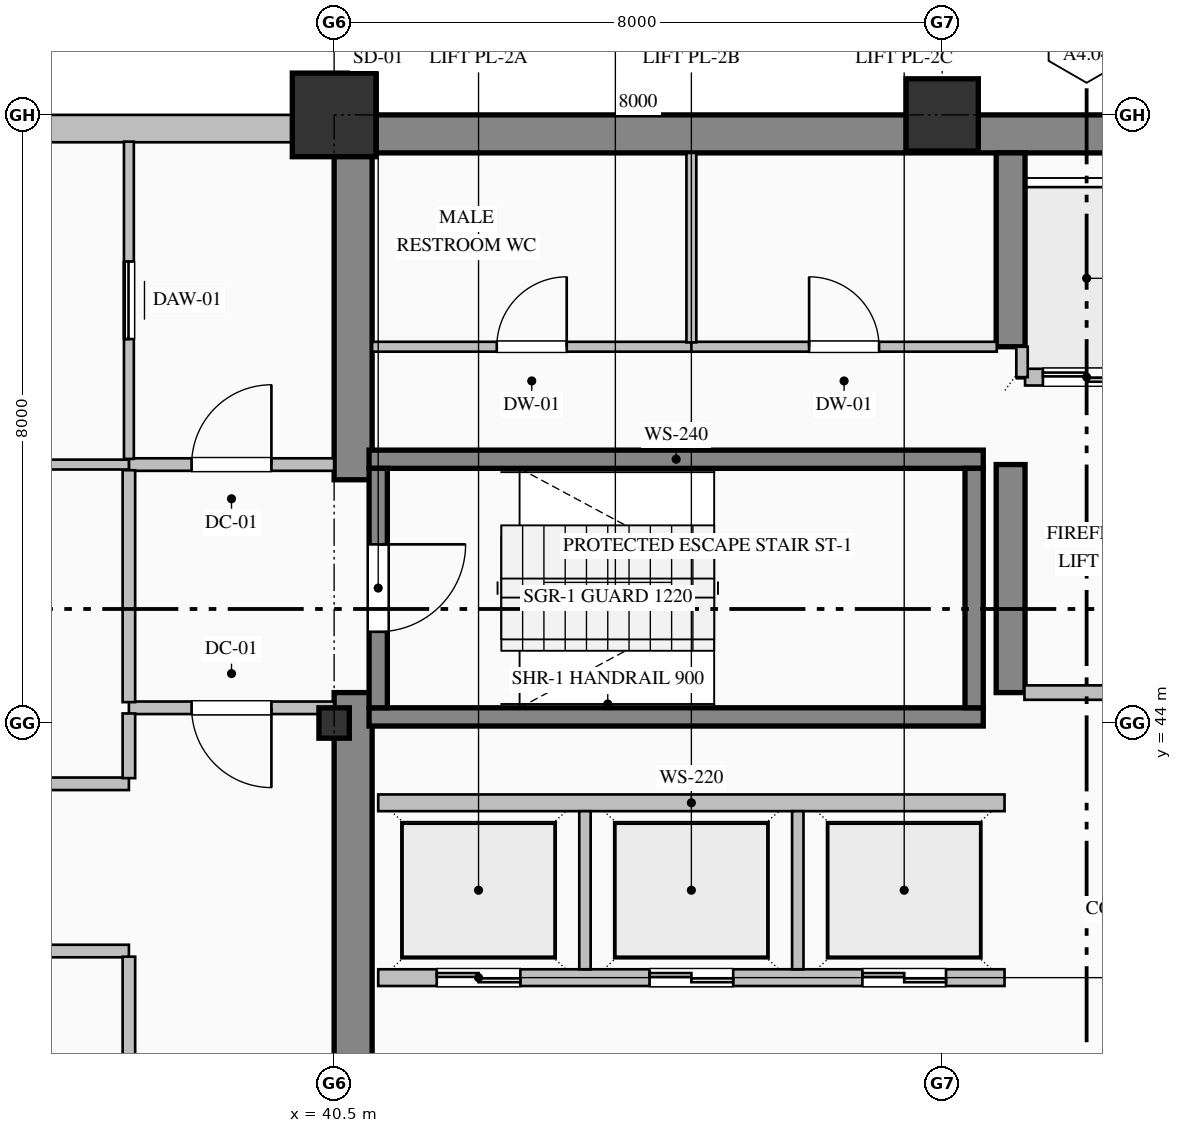
"""IFC4 building model, lengths in metres.
Left out: names, types, materials, properties, quantities, classifications, styles, units other than length and angle.
Written with IfcOpenShell. Run it as: python <this file> out.ifc"""

import sys

from ifc_helpers import new_model, si_unit, direction, frame, frame_2d, origin, origin_2d, place, context, subcontext, project, spatial, rectangle, hollow_rectangle, i_section, extrude, element, fill, save


model = new_model("IFC4")
c1 = context("Model", 3, precision=1e-05, world=origin(), true_north=direction((0.0, 1.0)))
c2 = subcontext(c1, "Body", "Model", "MODEL_VIEW")
j1 = project(units=[si_unit("LENGTHUNIT", "METRE"), si_unit("PLANEANGLEUNIT", "RADIAN")], contexts=[c1])
p1 = place(None, origin())
s1 = spatial("IfcSite", under=j1, at=p1, CompositionType="ELEMENT")
p2 = place(p1, origin())
s2 = spatial("IfcBuilding", under=s1, at=p2, CompositionType="ELEMENT")
p3 = place(p2, frame((0.0, 0.0, 183.0)))
s3 = spatial("IfcBuildingStorey", under=s2, at=p3, CompositionType="ELEMENT", Elevation=183.0)
p4 = place(p3, frame((40.5, 51.75, 0.0), z_axis=(0.0, 0.0, 1.0), x_axis=(1.0, 0.0, 0.0)))
e1 = element("IfcWall", 1, at=p4, inside=s3, PredefinedType="SHEAR", context=c2, shape_type="SweptSolid", body=[
    extrude(rectangle(XDim=23.5, YDim=0.5, at=frame_2d((11.75, 0.0))), origin(), (0.0, 0.0, 1.0), 3.765),
])
p5 = place(p3, frame((40.75, 36.5, 0.0), z_axis=(0.0, 0.0, 1.0), x_axis=(0.0, 1.0, 0.0)))
e2 = element("IfcWall", 2, at=p5, inside=s3, PredefinedType="SHEAR", context=c2, shape_type="SweptSolid", body=[
    extrude(rectangle(XDim=7.9, YDim=0.5, at=frame_2d((3.95, 0.0))), origin(), (0.0, 0.0, 1.0), 3.765),
])
p6 = place(p3, frame((40.75, 47.2, 0.0), z_axis=(0.0, 0.0, 1.0), x_axis=(0.0, 1.0, 0.0)))
e3 = element("IfcWall", 3, at=p6, inside=s3, PredefinedType="SHEAR", context=c2, shape_type="SweptSolid", body=[
    extrude(rectangle(XDim=4.3, YDim=0.5, at=frame_2d((2.15, 0.0))), origin(), (0.0, 0.0, 1.0), 3.765),
])
p7 = place(p3, frame((49.4, 44.4, 0.0), z_axis=(0.0, 0.0, 1.0), x_axis=(0.0, 1.0, 0.0)))
e4 = element("IfcWall", 4, at=p7, inside=s3, PredefinedType="SHEAR", context=c2, shape_type="SweptSolid", body=[
    extrude(rectangle(XDim=3.0, YDim=0.38, at=frame_2d((1.5, 0.0))), origin(), (0.0, 0.0, 1.0), 3.765),
])
p8 = place(p3, frame((49.4, 48.95, 0.0), z_axis=(0.0, 0.0, 1.0), x_axis=(0.0, 1.0, 0.0)))
e5 = element("IfcWall", 5, at=p8, inside=s3, PredefinedType="SHEAR", context=c2, shape_type="SweptSolid", body=[
    extrude(rectangle(XDim=2.55, YDim=0.38, at=frame_2d((1.275, 0.0))), origin(), (0.0, 0.0, 1.0), 3.765),
])
p9 = place(p3, frame((40.5, 44.0, 0.0), z_axis=(0.0, 0.0, 1.0), x_axis=(1.0, 0.0, 0.0)))
e6 = element("IfcColumn", 6, at=p9, inside=s3, PredefinedType="COLUMN", context=c2, shape_type="SweptSolid", body=[
    extrude(i_section(OverallWidth=0.4, OverallDepth=0.4, WebThickness=0.013, FlangeThickness=0.021, FilletRadius=0.022, at=origin_2d()), origin(), (0.0, 0.0, 1.0), 4.0),
])
p10 = place(p3, frame((40.5, 52.0, 0.0), z_axis=(0.0, 0.0, 1.0), x_axis=(1.0, 0.0, 0.0)))
e7 = element("IfcColumn", 7, at=p10, inside=s3, PredefinedType="COLUMN", context=c2, shape_type="SweptSolid", body=[
    extrude(hollow_rectangle(XDim=1.1, YDim=1.1, WallThickness=0.04, at=origin_2d()), origin(), (0.0, 0.0, 1.0), 4.0),
])
p11 = place(p3, frame((48.5, 52.0, 0.0), z_axis=(0.0, 0.0, 1.0), x_axis=(1.0, 0.0, 0.0)))
e8 = element("IfcColumn", 8, at=p11, inside=s3, PredefinedType="COLUMN", context=c2, shape_type="SweptSolid", body=[
    extrude(hollow_rectangle(XDim=0.95, YDim=0.95, WallThickness=0.036, at=origin_2d()), origin(), (0.0, 0.0, 1.0), 4.0),
])
p12 = place(p3, frame((13.0, 51.82, 0.0), z_axis=(0.0, 0.0, 1.0), x_axis=(1.0, 0.0, 0.0)))
e9 = element("IfcWall", 9, at=p12, inside=s3, PredefinedType="SOLIDWALL", context=c2, shape_type="SweptSolid", body=[
    extrude(rectangle(XDim=27.52, YDim=0.36, at=frame_2d((13.76, 0.0))), origin(), (0.0, 0.0, 1.0), 3.265),
])
p13 = place(p12, frame((6.6, 0.0, 0.7)))
e10 = element("IfcOpeningElement", 10, at=p13, cuts=e9, PredefinedType="OPENING", context=c2, shape_type="SweptSolid", body=[
    extrude(rectangle(XDim=1.2, YDim=1.85, at=frame_2d((0.6, 0.925))), frame((0.0, 0.19, 0.0), z_axis=(0.0, -1.0, 0.0), x_axis=(1.0, 0.0, 0.0)), (0.0, 0.0, 1.0), 0.38),
])
p14 = place(p12, frame((13.575, 0.0, 0.85)))
e11 = element("IfcOpeningElement", 11, at=p14, cuts=e9, PredefinedType="OPENING", context=c2, shape_type="SweptSolid", body=[
    extrude(rectangle(XDim=1.65, YDim=1.95, at=frame_2d((0.825, 0.975))), frame((0.0, 0.19, 0.0), z_axis=(0.0, -1.0, 0.0), x_axis=(1.0, 0.0, 0.0)), (0.0, 0.0, 1.0), 0.38),
])
for number, where, z_axis, x_axis in (
    (12, (40.96, 47.47, 0.0), (0.0, 0.0, 1.0), (1.0, 0.0, 0.0)),
    (13, (49.04, 44.08, 0.0), (0.0, 0.0, 1.0), (-1.0, 0.0, 0.0)),
):
    element("IfcWall", number, at=place(p3, frame(where, z_axis=z_axis, x_axis=x_axis)), inside=s3, PredefinedType="SOLIDWALL", context=c2, shape_type="SweptSolid", body=[
        extrude(rectangle(XDim=8.08, YDim=0.24, at=frame_2d((4.04, 0.0))), origin(), (0.0, 0.0, 1.0), 4.0),
    ])
p15 = place(p3, frame((41.08, 47.35, 0.0), z_axis=(0.0, 0.0, 1.0), x_axis=(0.0, -1.0, 0.0)))
e14 = element("IfcWall", 14, at=p15, inside=s3, PredefinedType="SOLIDWALL", context=c2, shape_type="SweptSolid", body=[
    extrude(rectangle(XDim=3.15, YDim=0.24, at=frame_2d((1.575, 0.0))), origin(), (0.0, 0.0, 1.0), 4.0),
])
p16 = place(p15, frame((1.0, 0.0, 0.0)))
e15 = element("IfcOpeningElement", 15, at=p16, cuts=e14, PredefinedType="OPENING", context=c2, shape_type="SweptSolid", body=[
    extrude(rectangle(XDim=1.15, YDim=2.2, at=frame_2d((0.575, 1.1))), frame((0.0, 0.13, 0.0), z_axis=(0.0, -1.0, 0.0), x_axis=(1.0, 0.0, 0.0)), (0.0, 0.0, 1.0), 0.26),
])
p17 = place(p3, frame((48.92, 44.2, 0.0), z_axis=(0.0, 0.0, 1.0), x_axis=(0.0, 1.0, 0.0)))
e16 = element("IfcWall", 16, at=p17, inside=s3, PredefinedType="SOLIDWALL", context=c2, shape_type="SweptSolid", body=[
    extrude(rectangle(XDim=3.15, YDim=0.24, at=frame_2d((1.575, 0.0))), origin(), (0.0, 0.0, 1.0), 4.0),
])
p18 = place(p3, frame((54.71, 48.55, 0.0), z_axis=(0.0, 0.0, 1.0), x_axis=(-1.0, 0.0, 0.0)))
e17 = element("IfcWall", 17, at=p18, inside=s3, PredefinedType="PARTITIONING", context=c2, shape_type="SweptSolid", body=[
    extrude(rectangle(XDim=5.12, YDim=0.22, at=frame_2d((2.56, 0.0))), origin(), (0.0, 0.0, 1.0), 3.765),
])
p19 = place(p18, frame((3.735, 0.0, 0.0)))
e18 = element("IfcOpeningElement", 18, at=p19, cuts=e17, PredefinedType="OPENING", context=c2, shape_type="SweptSolid", body=[
    extrude(rectangle(XDim=1.15, YDim=2.2, at=frame_2d((0.575, 1.1))), frame((0.0, 0.12, 0.0), z_axis=(0.0, -1.0, 0.0), x_axis=(1.0, 0.0, 0.0)), (0.0, 0.0, 1.0), 0.24),
])
p20 = place(p18, frame((0.935, 0.0, 0.0)))
e19 = element("IfcOpeningElement", 19, at=p20, cuts=e17, PredefinedType="OPENING", context=c2, shape_type="SweptSolid", body=[
    extrude(rectangle(XDim=1.15, YDim=2.2, at=frame_2d((0.575, 1.1))), frame((0.0, 0.12, 0.0), z_axis=(0.0, -1.0, 0.0), x_axis=(1.0, 0.0, 0.0)), (0.0, 0.0, 1.0), 0.24),
])
p21 = place(p3, frame((49.55, 48.55, 0.0), z_axis=(0.0, 0.0, 1.0), x_axis=(0.0, 1.0, 0.0)))
e20 = element("IfcWall", 20, at=p21, inside=s3, PredefinedType="PARTITIONING", context=c2, shape_type="SweptSolid", body=[
    extrude(rectangle(XDim=0.4, YDim=0.15, at=frame_2d((0.2, 0.0))), origin(), (0.0, 0.0, 1.0), 3.765),
])
p22 = place(p3, frame((49.32, 40.65, 0.0), z_axis=(0.0, 0.0, 1.0), x_axis=(-1.0, 0.0, 0.0)))
e21 = element("IfcWall", 21, at=p22, inside=s3, PredefinedType="PARTITIONING", context=c2, shape_type="SweptSolid", body=[
    extrude(rectangle(XDim=8.24, YDim=0.22, at=frame_2d((4.12, 0.0))), origin(), (0.0, 0.0, 1.0), 3.765),
])
p23 = place(p22, frame((6.37, 0.0, 0.0)))
e22 = element("IfcOpeningElement", 22, at=p23, cuts=e21, PredefinedType="OPENING", context=c2, shape_type="SweptSolid", body=[
    extrude(rectangle(XDim=1.1, YDim=2.2, at=frame_2d((0.55, 1.1))), frame((0.0, 0.12, 0.0), z_axis=(0.0, -1.0, 0.0), x_axis=(1.0, 0.0, 0.0)), (0.0, 0.0, 1.0), 0.24),
])
p24 = place(p22, frame((3.57, 0.0, 0.0)))
e23 = element("IfcOpeningElement", 23, at=p24, cuts=e21, PredefinedType="OPENING", context=c2, shape_type="SweptSolid", body=[
    extrude(rectangle(XDim=1.1, YDim=2.2, at=frame_2d((0.55, 1.1))), frame((0.0, 0.12, 0.0), z_axis=(0.0, -1.0, 0.0), x_axis=(1.0, 0.0, 0.0)), (0.0, 0.0, 1.0), 0.24),
])
p25 = place(p22, frame((0.77, 0.0, 0.0)))
e24 = element("IfcOpeningElement", 24, at=p25, cuts=e21, PredefinedType="OPENING", context=c2, shape_type="SweptSolid", body=[
    extrude(rectangle(XDim=1.1, YDim=2.2, at=frame_2d((0.55, 1.1))), frame((0.0, 0.12, 0.0), z_axis=(0.0, -1.0, 0.0), x_axis=(1.0, 0.0, 0.0)), (0.0, 0.0, 1.0), 0.24),
])
p26 = place(p3, frame((41.08, 42.95, 0.0), z_axis=(0.0, 0.0, 1.0), x_axis=(1.0, 0.0, 0.0)))
e25 = element("IfcWall", 25, at=p26, inside=s3, PredefinedType="PARTITIONING", context=c2, shape_type="SweptSolid", body=[
    extrude(rectangle(XDim=8.24, YDim=0.22, at=frame_2d((4.12, 0.0))), origin(), (0.0, 0.0, 1.0), 3.765),
])
for number, where, z_axis, x_axis in (
    (26, (43.8, 40.76, 0.0), (0.0, 0.0, 1.0), (0.0, 1.0, 0.0)),
    (27, (46.6, 40.76, 0.0), (0.0, 0.0, 1.0), (0.0, 1.0, 0.0)),
):
    element("IfcWall", number, at=place(p3, frame(where, z_axis=z_axis, x_axis=x_axis)), inside=s3, PredefinedType="PARTITIONING", context=c2, shape_type="SweptSolid", body=[
        extrude(rectangle(XDim=2.08, YDim=0.15, at=frame_2d((1.04, 0.0))), origin(), (0.0, 0.0, 1.0), 3.765),
    ])
p27 = place(p3, frame((37.8, 47.4, 0.0), z_axis=(0.0, 0.0, 1.0), x_axis=(1.0, 0.0, 0.0)))
e28 = element("IfcWall", 28, at=p27, inside=s3, PredefinedType="PARTITIONING", context=c2, shape_type="SweptSolid", body=[
    extrude(rectangle(XDim=2.7, YDim=0.165, at=frame_2d((1.35, 0.0))), origin(), (0.0, 0.0, 1.0), 3.765),
])
p28 = place(p27, frame((0.825, 0.0, 0.0)))
e29 = element("IfcOpeningElement", 29, at=p28, cuts=e28, PredefinedType="OPENING", context=c2, shape_type="SweptSolid", body=[
    extrude(rectangle(XDim=1.05, YDim=2.15, at=frame_2d((0.525, 1.075))), frame((0.0, 0.093, 0.0), z_axis=(0.0, -1.0, 0.0), x_axis=(1.0, 0.0, 0.0)), (0.0, 0.0, 1.0), 0.185),
])
p29 = place(p3, frame((40.5, 44.2, 0.0), z_axis=(0.0, 0.0, 1.0), x_axis=(-1.0, 0.0, 0.0)))
e30 = element("IfcWall", 30, at=p29, inside=s3, PredefinedType="PARTITIONING", context=c2, shape_type="SweptSolid", body=[
    extrude(rectangle(XDim=2.7, YDim=0.165, at=frame_2d((1.35, 0.0))), origin(), (0.0, 0.0, 1.0), 3.765),
])
p30 = place(p29, frame((0.825, 0.0, 0.0)))
e31 = element("IfcOpeningElement", 31, at=p30, cuts=e30, PredefinedType="OPENING", context=c2, shape_type="SweptSolid", body=[
    extrude(rectangle(XDim=1.05, YDim=2.15, at=frame_2d((0.525, 1.075))), frame((0.0, 0.093, 0.0), z_axis=(0.0, -1.0, 0.0), x_axis=(1.0, 0.0, 0.0)), (0.0, 0.0, 1.0), 0.185),
])
p31 = place(p3, frame((37.8, 44.274, 0.0), z_axis=(0.0, 0.0, 1.0), x_axis=(0.0, 1.0, 0.0)))
e32 = element("IfcWall", 32, at=p31, inside=s3, PredefinedType="PARTITIONING", context=c2, shape_type="SweptSolid", body=[
    extrude(rectangle(XDim=3.051, YDim=0.165, at=frame_2d((1.525, 0.0))), origin(), (0.0, 0.0, 1.0), 3.765),
])
p32 = place(p3, frame((37.8, 47.475, 0.0), z_axis=(0.0, 0.0, 1.0), x_axis=(0.0, 1.0, 0.0)))
e33 = element("IfcWall", 33, at=p32, inside=s3, PredefinedType="PARTITIONING", context=c2, shape_type="SweptSolid", body=[
    extrude(rectangle(XDim=4.173, YDim=0.13, at=frame_2d((2.087, 0.0))), origin(), (0.0, 0.0, 1.0), 3.765),
])
p33 = place(p32, frame((1.577, 0.0, 0.0)))
e34 = element("IfcOpeningElement", 34, at=p33, cuts=e33, PredefinedType="OPENING", context=c2, shape_type="SweptSolid", body=[
    extrude(rectangle(XDim=1.02, YDim=2.15, at=frame_2d((0.51, 1.075))), frame((0.0, 0.075, 0.0), z_axis=(0.0, -1.0, 0.0), x_axis=(1.0, 0.0, 0.0)), (0.0, 0.0, 1.0), 0.15),
])
p34 = place(p3, frame((37.8, 47.4, 0.0), z_axis=(0.0, 0.0, 1.0), x_axis=(-1.0, 0.0, 0.0)))
e35 = element("IfcWall", 35, at=p34, inside=s3, PredefinedType="PARTITIONING", context=c2, shape_type="SweptSolid", body=[
    extrude(rectangle(XDim=2.4, YDim=0.13, at=frame_2d((1.2, 0.0))), origin(), (0.0, 0.0, 1.0), 3.765),
])
p35 = place(p3, frame((41.0, 48.95, 0.0), z_axis=(0.0, 0.0, 1.0), x_axis=(1.0, 0.0, 0.0)))
e36 = element("IfcWall", 36, at=p35, inside=s3, PredefinedType="PARTITIONING", context=c2, shape_type="SweptSolid", body=[
    extrude(rectangle(XDim=4.2, YDim=0.13, at=frame_2d((2.1, 0.0))), origin(), (0.0, 0.0, 1.0), 3.765),
])
p36 = place(p35, frame((1.64, 0.0, 0.0)))
e37 = element("IfcOpeningElement", 37, at=p36, cuts=e36, PredefinedType="OPENING", context=c2, shape_type="SweptSolid", body=[
    extrude(rectangle(XDim=0.92, YDim=2.15, at=frame_2d((0.46, 1.075))), frame((0.0, 0.075, 0.0), z_axis=(0.0, -1.0, 0.0), x_axis=(1.0, 0.0, 0.0)), (0.0, 0.0, 1.0), 0.15),
])
p37 = place(p3, frame((45.2, 48.95, 0.0), z_axis=(0.0, 0.0, 1.0), x_axis=(1.0, 0.0, 0.0)))
e38 = element("IfcWall", 38, at=p37, inside=s3, PredefinedType="PARTITIONING", context=c2, shape_type="SweptSolid", body=[
    extrude(rectangle(XDim=4.018, YDim=0.13, at=frame_2d((2.009, 0.0))), origin(), (0.0, 0.0, 1.0), 3.765),
])
p38 = place(p37, frame((1.549, 0.0, 0.0)))
e39 = element("IfcOpeningElement", 39, at=p38, cuts=e38, PredefinedType="OPENING", context=c2, shape_type="SweptSolid", body=[
    extrude(rectangle(XDim=0.92, YDim=2.15, at=frame_2d((0.46, 1.075))), frame((0.0, 0.075, 0.0), z_axis=(0.0, -1.0, 0.0), x_axis=(1.0, 0.0, 0.0)), (0.0, 0.0, 1.0), 0.15),
])
p39 = place(p3, frame((54.718, 44.4, 0.0), z_axis=(0.0, 0.0, 1.0), x_axis=(-1.0, 0.0, 0.0)))
e40 = element("IfcWall", 40, at=p39, inside=s3, PredefinedType="PARTITIONING", context=c2, shape_type="SweptSolid", body=[
    extrude(rectangle(XDim=5.136, YDim=0.19, at=frame_2d((2.568, 0.0))), origin(), (0.0, 0.0, 1.0), 3.765),
])
p40 = place(p39, frame((2.043, 0.0, 0.0)))
e41 = element("IfcOpeningElement", 41, at=p40, cuts=e40, PredefinedType="OPENING", context=c2, shape_type="SweptSolid", body=[
    extrude(rectangle(XDim=1.05, YDim=2.15, at=frame_2d((0.525, 1.075))), frame((0.0, 0.105, 0.0), z_axis=(0.0, -1.0, 0.0), x_axis=(1.0, 0.0, 0.0)), (0.0, 0.0, 1.0), 0.21),
])
p41 = place(p3, frame((45.2, 51.5, 0.0), z_axis=(0.0, 0.0, 1.0), x_axis=(0.0, -1.0, 0.0)))
e42 = element("IfcWall", 42, at=p41, inside=s3, PredefinedType="PARTITIONING", context=c2, shape_type="SweptSolid", body=[
    extrude(rectangle(XDim=2.493, YDim=0.13, at=frame_2d((1.247, 0.0))), origin(), (0.0, 0.0, 1.0), 3.765),
])
p42 = place(p3, frame((31.0, 43.2, 0.0), z_axis=(0.0, 0.0, 1.0), x_axis=(1.0, 0.0, 0.0)))
e43 = element("IfcWall", 43, at=p42, inside=s3, PredefinedType="PARTITIONING", context=c2, shape_type="SweptSolid", body=[
    extrude(rectangle(XDim=6.8, YDim=0.165, at=frame_2d((3.4, 0.0))), origin(), (0.0, 0.0, 1.0), 3.765),
])
p43 = place(p42, frame((2.9, 0.0, 0.0)))
e44 = element("IfcOpeningElement", 44, at=p43, cuts=e43, PredefinedType="OPENING", context=c2, shape_type="SweptSolid", body=[
    extrude(rectangle(XDim=1.0, YDim=2.15, at=frame_2d((0.5, 1.075))), frame((0.0, 0.093, 0.0), z_axis=(0.0, -1.0, 0.0), x_axis=(1.0, 0.0, 0.0)), (0.0, 0.0, 1.0), 0.185),
])
p44 = place(p3, frame((37.8, 41.0, 0.0), z_axis=(0.0, 0.0, 1.0), x_axis=(-1.0, 0.0, 0.0)))
e45 = element("IfcWall", 45, at=p44, inside=s3, PredefinedType="PARTITIONING", context=c2, shape_type="SweptSolid", body=[
    extrude(rectangle(XDim=4.6, YDim=0.165, at=frame_2d((2.3, 0.0))), origin(), (0.0, 0.0, 1.0), 3.765),
])
p45 = place(p3, frame((37.8, 43.274, 0.0), z_axis=(0.0, 0.0, 1.0), x_axis=(0.0, 1.0, 0.0)))
e46 = element("IfcWall", 46, at=p45, inside=s3, PredefinedType="PARTITIONING", context=c2, shape_type="SweptSolid", body=[
    extrude(rectangle(XDim=0.851, YDim=0.165, at=frame_2d((0.426, 0.0))), origin(), (0.0, 0.0, 1.0), 3.765),
])
p46 = place(p3, frame((37.8, 33.475, 0.0), z_axis=(0.0, 0.0, 1.0), x_axis=(0.0, 1.0, 0.0)))
e47 = element("IfcWall", 47, at=p46, inside=s3, PredefinedType="PARTITIONING", context=c2, shape_type="SweptSolid", body=[
    extrude(rectangle(XDim=7.451, YDim=0.165, at=frame_2d((3.726, 0.0))), origin(), (0.0, 0.0, 1.0), 3.765),
])
p47 = place(p46, frame((3.226, 0.0, 0.0)))
e48 = element("IfcOpeningElement", 48, at=p47, cuts=e47, PredefinedType="OPENING", context=c2, shape_type="SweptSolid", body=[
    extrude(rectangle(XDim=1.0, YDim=2.15, at=frame_2d((0.5, 1.075))), frame((0.0, 0.093, 0.0), z_axis=(0.0, -1.0, 0.0), x_axis=(1.0, 0.0, 0.0)), (0.0, 0.0, 1.0), 0.185),
])
p48 = place(p16, origin())
e49 = element("IfcDoor", 49, at=p48, inside=s3, OperationType="SINGLE_SWING_LEFT", PredefinedType="DOOR", context=c2, shape_type="SweptSolid", body=[
    extrude(rectangle(XDim=1.15, YDim=2.2, at=frame_2d((0.575, 1.1))), frame((0.0, 0.025, 0.0), z_axis=(0.0, -1.0, 0.0), x_axis=(1.0, 0.0, 0.0)), (0.0, 0.0, 1.0), 0.05),
])
fill(e15, e49)
p49 = place(p19, origin())
e50 = element("IfcDoor", 50, at=p49, inside=s3, OperationType="DOUBLE_DOOR_SLIDING", PredefinedType="DOOR", context=c2, shape_type="SweptSolid", body=[
    extrude(rectangle(XDim=1.15, YDim=2.2, at=frame_2d((0.575, 1.1))), frame((0.0, 0.025, 0.0), z_axis=(0.0, -1.0, 0.0), x_axis=(1.0, 0.0, 0.0)), (0.0, 0.0, 1.0), 0.05),
])
fill(e18, e50)
p50 = place(p23, origin())
e51 = element("IfcDoor", 51, at=p50, inside=s3, OperationType="DOUBLE_DOOR_SLIDING", PredefinedType="DOOR", context=c2, shape_type="SweptSolid", body=[
    extrude(rectangle(XDim=1.1, YDim=2.2, at=frame_2d((0.55, 1.1))), frame((0.0, 0.025, 0.0), z_axis=(0.0, -1.0, 0.0), x_axis=(1.0, 0.0, 0.0)), (0.0, 0.0, 1.0), 0.05),
])
fill(e22, e51)
p51 = place(p24, origin())
e52 = element("IfcDoor", 52, at=p51, inside=s3, OperationType="DOUBLE_DOOR_SLIDING", PredefinedType="DOOR", context=c2, shape_type="SweptSolid", body=[
    extrude(rectangle(XDim=1.1, YDim=2.2, at=frame_2d((0.55, 1.1))), frame((0.0, 0.025, 0.0), z_axis=(0.0, -1.0, 0.0), x_axis=(1.0, 0.0, 0.0)), (0.0, 0.0, 1.0), 0.05),
])
fill(e23, e52)
p52 = place(p25, origin())
e53 = element("IfcDoor", 53, at=p52, inside=s3, OperationType="DOUBLE_DOOR_SLIDING", PredefinedType="DOOR", context=c2, shape_type="SweptSolid", body=[
    extrude(rectangle(XDim=1.1, YDim=2.2, at=frame_2d((0.55, 1.1))), frame((0.0, 0.025, 0.0), z_axis=(0.0, -1.0, 0.0), x_axis=(1.0, 0.0, 0.0)), (0.0, 0.0, 1.0), 0.05),
])
fill(e24, e53)
p53 = place(p28, origin())
e54 = element("IfcDoor", 54, at=p53, inside=s3, OperationType="SINGLE_SWING_RIGHT", PredefinedType="DOOR", context=c2, shape_type="SweptSolid", body=[
    extrude(rectangle(XDim=1.05, YDim=2.15, at=frame_2d((0.525, 1.075))), frame((0.0, 0.025, 0.0), z_axis=(0.0, -1.0, 0.0), x_axis=(1.0, 0.0, 0.0)), (0.0, 0.0, 1.0), 0.05),
])
fill(e29, e54)
p54 = place(p30, origin())
e55 = element("IfcDoor", 55, at=p54, inside=s3, OperationType="SINGLE_SWING_LEFT", PredefinedType="DOOR", context=c2, shape_type="SweptSolid", body=[
    extrude(rectangle(XDim=1.05, YDim=2.15, at=frame_2d((0.525, 1.075))), frame((0.0, 0.025, 0.0), z_axis=(0.0, -1.0, 0.0), x_axis=(1.0, 0.0, 0.0)), (0.0, 0.0, 1.0), 0.05),
])
fill(e31, e55)
p55 = place(p33, origin())
e56 = element("IfcDoor", 56, at=p55, inside=s3, OperationType="SLIDING_TO_LEFT", PredefinedType="DOOR", context=c2, shape_type="SweptSolid", body=[
    extrude(rectangle(XDim=1.02, YDim=2.15, at=frame_2d((0.51, 1.075))), frame((0.0, 0.025, 0.0), z_axis=(0.0, -1.0, 0.0), x_axis=(1.0, 0.0, 0.0)), (0.0, 0.0, 1.0), 0.05),
])
fill(e34, e56)
p56 = place(p36, origin())
e57 = element("IfcDoor", 57, at=p56, inside=s3, OperationType="SINGLE_SWING_RIGHT", PredefinedType="DOOR", context=c2, shape_type="SweptSolid", body=[
    extrude(rectangle(XDim=0.92, YDim=2.15, at=frame_2d((0.46, 1.075))), frame((0.0, 0.025, 0.0), z_axis=(0.0, -1.0, 0.0), x_axis=(1.0, 0.0, 0.0)), (0.0, 0.0, 1.0), 0.05),
])
fill(e37, e57)
p57 = place(p38, origin())
e58 = element("IfcDoor", 58, at=p57, inside=s3, OperationType="SINGLE_SWING_LEFT", PredefinedType="DOOR", context=c2, shape_type="SweptSolid", body=[
    extrude(rectangle(XDim=0.92, YDim=2.15, at=frame_2d((0.46, 1.075))), frame((0.0, 0.025, 0.0), z_axis=(0.0, -1.0, 0.0), x_axis=(1.0, 0.0, 0.0)), (0.0, 0.0, 1.0), 0.05),
])
fill(e39, e58)
save(model, sys.argv[1])
